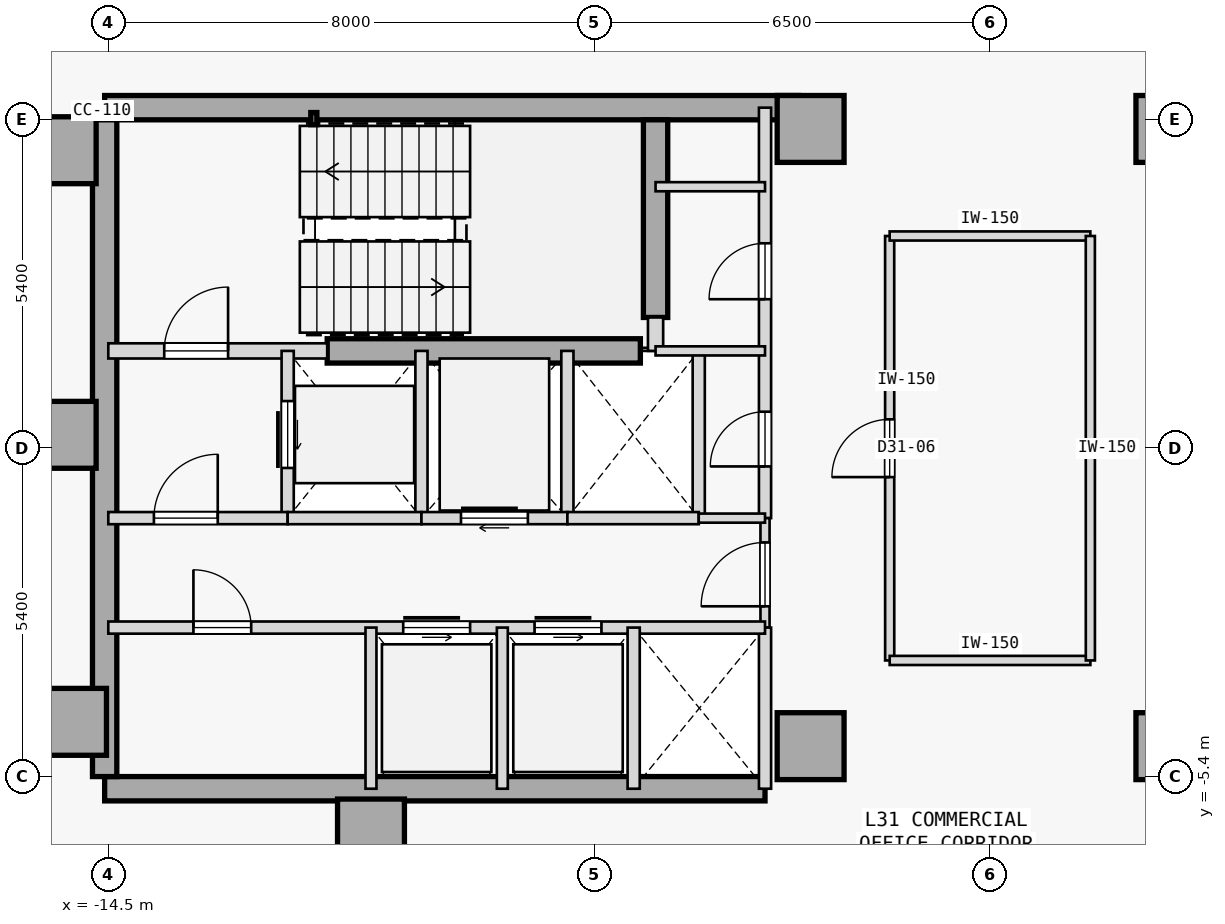
"""IFC4 building model, lengths in metres.
Left out: names, types, materials, properties, quantities, classifications, styles, units other than length and angle.
Written with IfcOpenShell. Run it as: python <this file> out.ifc"""

import sys

from ifc_helpers import new_model, si_unit, direction, frame, frame_2d, origin, origin_2d, place, context, subcontext, project, spatial, rectangle, hollow_rectangle, extrude, element, fill, save


model = new_model("IFC4")
c1 = context("Model", 3, precision=1e-05, world=origin(), true_north=direction((0.0, 1.0)))
c2 = subcontext(c1, "Body", "Model", "MODEL_VIEW")
j1 = project(units=[si_unit("LENGTHUNIT", "METRE"), si_unit("PLANEANGLEUNIT", "RADIAN")], contexts=[c1])
p1 = place(None, origin())
s1 = spatial("IfcSite", under=j1, at=p1, CompositionType="ELEMENT")
p2 = place(p1, origin())
s2 = spatial("IfcBuilding", under=s1, at=p2, CompositionType="ELEMENT")
p3 = place(p2, frame((0.0, 0.0, 124.4)))
s3 = spatial("IfcBuildingStorey", under=s2, at=p3, CompositionType="ELEMENT", Elevation=124.4)
for number, where, z_axis, x_axis in (
    (1, (-15.25, 4.9, 0.0), (0.0, 0.0, 1.0), (1.0, 0.0, 0.0)),
    (2, (-15.25, 0.22, 0.0), (0.0, 0.0, 1.0), (1.0, 0.0, 0.0)),
    (3, (-15.08, -4.5, 0.0), (0.0, 0.0, 1.0), (1.0, 0.0, 0.0)),
    (4, (-10.18, -6.32, 0.0), (0.0, 0.0, 1.0), (1.0, 0.0, 0.0)),
    (5, (-2.95, -4.9, 0.0), (0.0, 0.0, 1.0), (1.0, 0.0, 0.0)),
    (6, (-2.95, 5.25, 0.0), (0.0, 0.0, 1.0), (1.0, 0.0, 0.0)),
    (7, (2.95, -4.9, 0.0), (0.0, 0.0, 1.0), (1.0, 0.0, 0.0)),
    (8, (2.95, 5.25, 0.0), (0.0, 0.0, 1.0), (1.0, 0.0, 0.0)),
):
    element("IfcColumn", number, at=place(p3, frame(where, z_axis=z_axis, x_axis=x_axis)), inside=s3, PredefinedType="COLUMN", context=c2, shape_type="SweptSolid", body=[
        extrude(rectangle(XDim=1.1, YDim=1.1, at=origin_2d()), origin(), (0.0, 0.0, 1.0), 3.7),
    ])
p4 = place(p3, frame((-14.56, 5.6, 0.0), z_axis=(0.0, 0.0, 1.0), x_axis=(1.0, 0.0, 0.0)))
e9 = element("IfcWall", 9, at=p4, inside=s3, PredefinedType="SHEAR", context=c2, shape_type="SweptSolid", body=[
    extrude(rectangle(XDim=11.41, YDim=0.4, at=frame_2d((5.705, 0.0))), origin(), (0.0, 0.0, 1.0), 3.475),
])
p5 = place(p3, frame((-14.56, -5.6, 0.0), z_axis=(0.0, 0.0, 1.0), x_axis=(1.0, 0.0, 0.0)))
e10 = element("IfcWall", 10, at=p5, inside=s3, PredefinedType="SHEAR", context=c2, shape_type="SweptSolid", body=[
    extrude(rectangle(XDim=10.86, YDim=0.4, at=frame_2d((5.43, 0.0))), origin(), (0.0, 0.0, 1.0), 3.475),
])
p6 = place(p3, frame((-14.56, -5.4, 0.0), z_axis=(0.0, 0.0, 1.0), x_axis=(0.0, 1.0, 0.0)))
e11 = element("IfcWall", 11, at=p6, inside=s3, PredefinedType="SHEAR", context=c2, shape_type="SweptSolid", body=[
    extrude(rectangle(XDim=10.8, YDim=0.4, at=frame_2d((5.4, 0.0))), origin(), (0.0, 0.0, 1.0), 3.475),
])
p7 = place(p3, frame((-5.5, 2.15, 0.0), z_axis=(0.0, 0.0, 1.0), x_axis=(0.0, 1.0, 0.0)))
e12 = element("IfcWall", 12, at=p7, inside=s3, PredefinedType="SHEAR", context=c2, shape_type="SweptSolid", body=[
    extrude(rectangle(XDim=3.25, YDim=0.4, at=frame_2d((1.625, 0.0))), origin(), (0.0, 0.0, 1.0), 3.475),
])
p8 = place(p3, frame((-10.9, 1.6, 0.0), z_axis=(0.0, 0.0, 1.0), x_axis=(1.0, 0.0, 0.0)))
e13 = element("IfcWall", 13, at=p8, inside=s3, PredefinedType="SHEAR", context=c2, shape_type="SweptSolid", body=[
    extrude(rectangle(XDim=5.15, YDim=0.4, at=frame_2d((2.575, 0.0))), origin(), (0.0, 0.0, 1.0), 3.475),
])
p9 = place(p3, frame((-11.12, 5.42, 0.0), z_axis=(0.0, 0.0, 1.0), x_axis=(1.0, 0.0, 0.0)))
e14 = element("IfcColumn", 14, at=p9, inside=s3, PredefinedType="COLUMN", context=c2, shape_type="SweptSolid", body=[
    extrude(hollow_rectangle(XDim=0.1, YDim=0.2, WallThickness=0.008, at=origin_2d()), origin(), (0.0, 0.0, 1.0), 3.7),
])
p10 = place(p3, frame((-14.5, 1.6, 0.0), z_axis=(0.0, 0.0, 1.0), x_axis=(1.0, 0.0, 0.0)))
e15 = element("IfcWall", 15, at=p10, inside=s3, PredefinedType="STANDARD", context=c2, shape_type="SweptSolid", body=[
    extrude(rectangle(XDim=3.6, YDim=0.25, at=frame_2d((1.8, 0.0))), origin(), (0.0, 0.0, 1.0), 3.475),
])
p11 = place(p10, frame((0.92, 0.0, 0.0)))
e16 = element("IfcOpeningElement", 16, at=p11, cuts=e15, PredefinedType="OPENING", context=c2, shape_type="SweptSolid", body=[
    extrude(rectangle(XDim=1.05, YDim=2.15, at=frame_2d((0.525, 1.075))), frame((0.0, 0.135, 0.0), z_axis=(0.0, -1.0, 0.0), x_axis=(1.0, 0.0, 0.0)), (0.0, 0.0, 1.0), 0.27),
])
p12 = place(p3, frame((-5.5, 1.6, 0.0), z_axis=(0.0, 0.0, 1.0), x_axis=(0.0, 1.0, 0.0)))
e17 = element("IfcWall", 17, at=p12, inside=s3, PredefinedType="STANDARD", context=c2, shape_type="SweptSolid", body=[
    extrude(rectangle(XDim=0.55, YDim=0.25, at=frame_2d((0.275, 0.0))), origin(), (0.0, 0.0, 1.0), 3.475),
])
p13 = place(p3, frame((-3.7, -1.15, 0.0), z_axis=(0.0, 0.0, 1.0), x_axis=(0.0, 1.0, 0.0)))
e18 = element("IfcWall", 18, at=p13, inside=s3, PredefinedType="STANDARD", context=c2, shape_type="SweptSolid", body=[
    extrude(rectangle(XDim=6.75, YDim=0.2, at=frame_2d((3.375, 0.0))), origin(), (0.0, 0.0, 1.0), 3.475),
])
p14 = place(p13, frame((3.6, 0.0, 0.0)))
e19 = element("IfcOpeningElement", 19, at=p14, cuts=e18, PredefinedType="OPENING", context=c2, shape_type="SweptSolid", body=[
    extrude(rectangle(XDim=0.92, YDim=2.15, at=frame_2d((0.46, 1.075))), frame((0.0, 0.11, 0.0), z_axis=(0.0, -1.0, 0.0), x_axis=(1.0, 0.0, 0.0)), (0.0, 0.0, 1.0), 0.22),
])
p15 = place(p13, frame((0.85, 0.0, 0.0)))
e20 = element("IfcOpeningElement", 20, at=p15, cuts=e18, PredefinedType="OPENING", context=c2, shape_type="SweptSolid", body=[
    extrude(rectangle(XDim=0.9, YDim=2.15, at=frame_2d((0.45, 1.075))), frame((0.0, 0.11, 0.0), z_axis=(0.0, -1.0, 0.0), x_axis=(1.0, 0.0, 0.0)), (0.0, 0.0, 1.0), 0.22),
])
p16 = place(p3, frame((-3.7, -2.95, 0.0), z_axis=(0.0, 0.0, 1.0), x_axis=(0.0, 1.0, 0.0)))
e21 = element("IfcWall", 21, at=p16, inside=s3, PredefinedType="PARTITIONING", context=c2, shape_type="SweptSolid", body=[
    extrude(rectangle(XDim=1.8, YDim=0.15, at=frame_2d((0.9, 0.0))), origin(), (0.0, 0.0, 1.0), 3.475),
])
p17 = place(p16, frame((0.35, 0.0, 0.0)))
e22 = element("IfcOpeningElement", 22, at=p17, cuts=e21, PredefinedType="OPENING", context=c2, shape_type="SweptSolid", body=[
    extrude(rectangle(XDim=1.05, YDim=2.18, at=frame_2d((0.525, 1.09))), frame((0.0, 0.085, 0.0), z_axis=(0.0, -1.0, 0.0), x_axis=(1.0, 0.0, 0.0)), (0.0, 0.0, 1.0), 0.17),
])
p18 = place(p3, frame((-3.7, -5.6, 0.0), z_axis=(0.0, 0.0, 1.0), x_axis=(0.0, 1.0, 0.0)))
e23 = element("IfcWall", 23, at=p18, inside=s3, PredefinedType="STANDARD", context=c2, shape_type="SweptSolid", body=[
    extrude(rectangle(XDim=2.65, YDim=0.2, at=frame_2d((1.325, 0.0))), origin(), (0.0, 0.0, 1.0), 3.475),
])
p19 = place(p3, frame((-11.55, -1.15, 0.0), z_axis=(0.0, 0.0, 1.0), x_axis=(0.0, 1.0, 0.0)))
e24 = element("IfcWall", 24, at=p19, inside=s3, PredefinedType="STANDARD", context=c2, shape_type="SweptSolid", body=[
    extrude(rectangle(XDim=2.75, YDim=0.2, at=frame_2d((1.375, 0.0))), origin(), (0.0, 0.0, 1.0), 3.475),
])
p20 = place(p19, frame((0.825, 0.0, 0.0)))
e25 = element("IfcOpeningElement", 25, at=p20, cuts=e24, PredefinedType="OPENING", context=c2, shape_type="SweptSolid", body=[
    extrude(rectangle(XDim=1.1, YDim=2.15, at=frame_2d((0.55, 1.075))), frame((0.0, 0.11, 0.0), z_axis=(0.0, -1.0, 0.0), x_axis=(1.0, 0.0, 0.0)), (0.0, 0.0, 1.0), 0.22),
])
p21 = place(p3, frame((-9.35, -1.15, 0.0), z_axis=(0.0, 0.0, 1.0), x_axis=(0.0, 1.0, 0.0)))
e26 = element("IfcWall", 26, at=p21, inside=s3, PredefinedType="STANDARD", context=c2, shape_type="SweptSolid", body=[
    extrude(rectangle(XDim=2.75, YDim=0.2, at=frame_2d((1.375, 0.0))), origin(), (0.0, 0.0, 1.0), 3.475),
])
p22 = place(p3, frame((-14.5, -1.15, 0.0), z_axis=(0.0, 0.0, 1.0), x_axis=(1.0, 0.0, 0.0)))
e27 = element("IfcWall", 27, at=p22, inside=s3, PredefinedType="STANDARD", context=c2, shape_type="SweptSolid", body=[
    extrude(rectangle(XDim=2.95, YDim=0.2, at=frame_2d((1.475, 0.0))), origin(), (0.0, 0.0, 1.0), 3.475),
])
p23 = place(p22, frame((0.75, 0.0, 0.0)))
e28 = element("IfcOpeningElement", 28, at=p23, cuts=e27, PredefinedType="OPENING", context=c2, shape_type="SweptSolid", body=[
    extrude(rectangle(XDim=1.05, YDim=2.18, at=frame_2d((0.525, 1.09))), frame((0.0, 0.11, 0.0), z_axis=(0.0, -1.0, 0.0), x_axis=(1.0, 0.0, 0.0)), (0.0, 0.0, 1.0), 0.22),
])
p24 = place(p3, frame((-11.55, -1.15, 0.0), z_axis=(0.0, 0.0, 1.0), x_axis=(1.0, 0.0, 0.0)))
e29 = element("IfcWall", 29, at=p24, inside=s3, PredefinedType="STANDARD", context=c2, shape_type="SweptSolid", body=[
    extrude(rectangle(XDim=2.2, YDim=0.2, at=frame_2d((1.1, 0.0))), origin(), (0.0, 0.0, 1.0), 3.475),
])
p25 = place(p3, frame((-6.95, -1.15, 0.0), z_axis=(0.0, 0.0, 1.0), x_axis=(0.0, 1.0, 0.0)))
e30 = element("IfcWall", 30, at=p25, inside=s3, PredefinedType="STANDARD", context=c2, shape_type="SweptSolid", body=[
    extrude(rectangle(XDim=2.75, YDim=0.2, at=frame_2d((1.375, 0.0))), origin(), (0.0, 0.0, 1.0), 3.475),
])
p26 = place(p3, frame((-9.35, -1.15, 0.0), z_axis=(0.0, 0.0, 1.0), x_axis=(1.0, 0.0, 0.0)))
e31 = element("IfcWall", 31, at=p26, inside=s3, PredefinedType="STANDARD", context=c2, shape_type="SweptSolid", body=[
    extrude(rectangle(XDim=2.4, YDim=0.2, at=frame_2d((1.2, 0.0))), origin(), (0.0, 0.0, 1.0), 3.475),
])
p27 = place(p26, frame((0.65, 0.0, 0.0)))
e32 = element("IfcOpeningElement", 32, at=p27, cuts=e31, PredefinedType="OPENING", context=c2, shape_type="SweptSolid", body=[
    extrude(rectangle(XDim=1.1, YDim=2.15, at=frame_2d((0.55, 1.075))), frame((0.0, 0.11, 0.0), z_axis=(0.0, -1.0, 0.0), x_axis=(1.0, 0.0, 0.0)), (0.0, 0.0, 1.0), 0.22),
])
p28 = place(p3, frame((-4.79, -1.15, 0.0), z_axis=(0.0, 0.0, 1.0), x_axis=(0.0, 1.0, 0.0)))
e33 = element("IfcWall", 33, at=p28, inside=s3, PredefinedType="STANDARD", context=c2, shape_type="SweptSolid", body=[
    extrude(rectangle(XDim=2.75, YDim=0.2, at=frame_2d((1.375, 0.0))), origin(), (0.0, 0.0, 1.0), 3.475),
])
p29 = place(p3, frame((-6.95, -1.15, 0.0), z_axis=(0.0, 0.0, 1.0), x_axis=(1.0, 0.0, 0.0)))
e34 = element("IfcWall", 34, at=p29, inside=s3, PredefinedType="STANDARD", context=c2, shape_type="SweptSolid", body=[
    extrude(rectangle(XDim=2.16, YDim=0.2, at=frame_2d((1.08, 0.0))), origin(), (0.0, 0.0, 1.0), 3.475),
])
p30 = place(p3, frame((-4.79, -1.15, 0.0), z_axis=(0.0, 0.0, 1.0), x_axis=(1.0, 0.0, 0.0)))
e35 = element("IfcWall", 35, at=p30, inside=s3, PredefinedType="PARTITIONING", context=c2, shape_type="SweptSolid", body=[
    extrude(rectangle(XDim=1.09, YDim=0.15, at=frame_2d((0.545, 0.0))), origin(), (0.0, 0.0, 1.0), 3.475),
])
p31 = place(p3, frame((-14.5, -2.95, 0.0), z_axis=(0.0, 0.0, 1.0), x_axis=(1.0, 0.0, 0.0)))
e36 = element("IfcWall", 36, at=p31, inside=s3, PredefinedType="STANDARD", context=c2, shape_type="SweptSolid", body=[
    extrude(rectangle(XDim=10.8, YDim=0.2, at=frame_2d((5.4, 0.0))), origin(), (0.0, 0.0, 1.0), 3.475),
])
p32 = place(p31, frame((4.85, 0.0, 0.0)))
e37 = element("IfcOpeningElement", 37, at=p32, cuts=e36, PredefinedType="OPENING", context=c2, shape_type="SweptSolid", body=[
    extrude(rectangle(XDim=1.1, YDim=2.15, at=frame_2d((0.55, 1.075))), frame((0.0, 0.11, 0.0), z_axis=(0.0, -1.0, 0.0), x_axis=(1.0, 0.0, 0.0)), (0.0, 0.0, 1.0), 0.22),
])
p33 = place(p31, frame((7.01, 0.0, 0.0)))
e38 = element("IfcOpeningElement", 38, at=p33, cuts=e36, PredefinedType="OPENING", context=c2, shape_type="SweptSolid", body=[
    extrude(rectangle(XDim=1.1, YDim=2.15, at=frame_2d((0.55, 1.075))), frame((0.0, 0.11, 0.0), z_axis=(0.0, -1.0, 0.0), x_axis=(1.0, 0.0, 0.0)), (0.0, 0.0, 1.0), 0.22),
])
p34 = place(p31, frame((1.4, 0.0, 0.0)))
e39 = element("IfcOpeningElement", 39, at=p34, cuts=e36, PredefinedType="OPENING", context=c2, shape_type="SweptSolid", body=[
    extrude(rectangle(XDim=0.95, YDim=2.15, at=frame_2d((0.475, 1.075))), frame((0.0, 0.11, 0.0), z_axis=(0.0, -1.0, 0.0), x_axis=(1.0, 0.0, 0.0)), (0.0, 0.0, 1.0), 0.22),
])
p35 = place(p3, frame((-5.86, -5.6, 0.0), z_axis=(0.0, 0.0, 1.0), x_axis=(0.0, 1.0, 0.0)))
e40 = element("IfcWall", 40, at=p35, inside=s3, PredefinedType="STANDARD", context=c2, shape_type="SweptSolid", body=[
    extrude(rectangle(XDim=2.65, YDim=0.2, at=frame_2d((1.325, 0.0))), origin(), (0.0, 0.0, 1.0), 3.475),
])
for number, where, z_axis, x_axis in (
    (41, (-10.18, -5.6, 0.0), (0.0, 0.0, 1.0), (0.0, 1.0, 0.0)),
    (42, (-8.02, -5.6, 0.0), (0.0, 0.0, 1.0), (0.0, 1.0, 0.0)),
):
    element("IfcWall", number, at=place(p3, frame(where, z_axis=z_axis, x_axis=x_axis)), inside=s3, PredefinedType="STANDARD", context=c2, shape_type="SweptSolid", body=[
        extrude(rectangle(XDim=2.65, YDim=0.18, at=frame_2d((1.325, 0.0))), origin(), (0.0, 0.0, 1.0), 3.475),
    ])
for number, where, z_axis, x_axis in (
    (43, (-5.5, 4.3, 0.0), (0.0, 0.0, 1.0), (1.0, 0.0, 0.0)),
    (44, (-5.5, 1.6, 0.0), (0.0, 0.0, 1.0), (1.0, 0.0, 0.0)),
):
    element("IfcWall", number, at=place(p3, frame(where, z_axis=z_axis, x_axis=x_axis)), inside=s3, PredefinedType="PARTITIONING", context=c2, shape_type="SweptSolid", body=[
        extrude(rectangle(XDim=1.8, YDim=0.15, at=frame_2d((0.9, 0.0))), origin(), (0.0, 0.0, 1.0), 3.475),
    ])
p36 = place(p3, frame((-1.65, -3.49, 0.0), z_axis=(0.0, 0.0, 1.0), x_axis=(-0.000104928124, 0.999999994495, 0.0)))
e45 = element("IfcWall", 45, at=p36, inside=s3, PredefinedType="PARTITIONING", context=c2, shape_type="SweptSolid", body=[
    extrude(rectangle(XDim=6.98, YDim=0.15, at=frame_2d((3.49, 0.0))), origin(), (0.0, 0.0, 1.0), 3.475),
])
p37 = place(p36, frame((3.015, 0.0, 0.0)))
e46 = element("IfcOpeningElement", 46, at=p37, cuts=e45, PredefinedType="OPENING", context=c2, shape_type="SweptSolid", body=[
    extrude(rectangle(XDim=0.95, YDim=2.15, at=frame_2d((0.475, 1.075))), frame((0.0, 0.085, 0.0), z_axis=(0.0, -1.0, 0.0), x_axis=(1.0, 0.0, 0.0)), (0.0, 0.0, 1.0), 0.17),
])
p38 = place(p3, frame((-1.65, -3.49, 0.0), z_axis=(0.0, 0.0, 1.0), x_axis=(1.0, 0.0, 0.0)))
e47 = element("IfcWall", 47, at=p38, inside=s3, PredefinedType="PARTITIONING", context=c2, shape_type="SweptSolid", body=[
    extrude(rectangle(XDim=3.3, YDim=0.15, at=frame_2d((1.65, 0.0))), origin(), (0.0, 0.0, 1.0), 3.475),
])
p39 = place(p3, frame((-1.65, 3.49, 0.0), z_axis=(0.0, 0.0, 1.0), x_axis=(1.0, 0.0, 0.0)))
e48 = element("IfcWall", 48, at=p39, inside=s3, PredefinedType="PARTITIONING", context=c2, shape_type="SweptSolid", body=[
    extrude(rectangle(XDim=3.3, YDim=0.15, at=frame_2d((1.65, 0.0))), origin(), (0.0, 0.0, 1.0), 3.475),
])
p40 = place(p3, frame((1.65, -3.49, 0.0), z_axis=(0.0, 0.0, 1.0), x_axis=(-6.9952083e-05, 0.999999997553, 0.0)))
e49 = element("IfcWall", 49, at=p40, inside=s3, PredefinedType="PARTITIONING", context=c2, shape_type="SweptSolid", body=[
    extrude(rectangle(XDim=6.98, YDim=0.15, at=frame_2d((3.49, 0.0))), origin(), (0.0, 0.0, 1.0), 3.475),
])
p41 = place(p11, origin())
e50 = element("IfcDoor", 50, at=p41, inside=s3, OperationType="SINGLE_SWING_RIGHT", PredefinedType="DOOR", context=c2, shape_type="SweptSolid", body=[
    extrude(rectangle(XDim=1.05, YDim=2.15, at=frame_2d((0.525, 1.075))), frame((0.0, 0.025, 0.0), z_axis=(0.0, -1.0, 0.0), x_axis=(1.0, 0.0, 0.0)), (0.0, 0.0, 1.0), 0.05),
])
fill(e16, e50)
p42 = place(p23, origin())
e51 = element("IfcDoor", 51, at=p42, inside=s3, OperationType="SINGLE_SWING_RIGHT", PredefinedType="DOOR", context=c2, shape_type="SweptSolid", body=[
    extrude(rectangle(XDim=1.05, YDim=2.18, at=frame_2d((0.525, 1.09))), frame((0.0, 0.025, 0.0), z_axis=(0.0, -1.0, 0.0), x_axis=(1.0, 0.0, 0.0)), (0.0, 0.0, 1.0), 0.05),
])
fill(e28, e51)
p43 = place(p17, origin())
e52 = element("IfcDoor", 52, at=p43, inside=s3, OperationType="SINGLE_SWING_LEFT", PredefinedType="DOOR", context=c2, shape_type="SweptSolid", body=[
    extrude(rectangle(XDim=1.05, YDim=2.18, at=frame_2d((0.525, 1.09))), frame((0.0, 0.025, 0.0), z_axis=(0.0, -1.0, 0.0), x_axis=(1.0, 0.0, 0.0)), (0.0, 0.0, 1.0), 0.05),
])
fill(e22, e52)
p44 = place(p20, origin())
e53 = element("IfcDoor", 53, at=p44, inside=s3, OperationType="SLIDING_TO_RIGHT", PredefinedType="DOOR", context=c2, shape_type="SweptSolid", body=[
    extrude(rectangle(XDim=1.1, YDim=2.15, at=frame_2d((0.55, 1.075))), frame((0.0, 0.025, 0.0), z_axis=(0.0, -1.0, 0.0), x_axis=(1.0, 0.0, 0.0)), (0.0, 0.0, 1.0), 0.05),
])
fill(e25, e53)
p45 = place(p27, origin())
e54 = element("IfcDoor", 54, at=p45, inside=s3, OperationType="SLIDING_TO_RIGHT", PredefinedType="DOOR", context=c2, shape_type="SweptSolid", body=[
    extrude(rectangle(XDim=1.1, YDim=2.15, at=frame_2d((0.55, 1.075))), frame((0.0, 0.025, 0.0), z_axis=(0.0, -1.0, 0.0), x_axis=(1.0, 0.0, 0.0)), (0.0, 0.0, 1.0), 0.05),
])
fill(e32, e54)
p46 = place(p32, origin())
e55 = element("IfcDoor", 55, at=p46, inside=s3, OperationType="SLIDING_TO_LEFT", PredefinedType="DOOR", context=c2, shape_type="SweptSolid", body=[
    extrude(rectangle(XDim=1.1, YDim=2.15, at=frame_2d((0.55, 1.075))), frame((0.0, 0.025, 0.0), z_axis=(0.0, -1.0, 0.0), x_axis=(1.0, 0.0, 0.0)), (0.0, 0.0, 1.0), 0.05),
])
fill(e37, e55)
p47 = place(p33, origin())
e56 = element("IfcDoor", 56, at=p47, inside=s3, OperationType="SLIDING_TO_LEFT", PredefinedType="DOOR", context=c2, shape_type="SweptSolid", body=[
    extrude(rectangle(XDim=1.1, YDim=2.15, at=frame_2d((0.55, 1.075))), frame((0.0, 0.025, 0.0), z_axis=(0.0, -1.0, 0.0), x_axis=(1.0, 0.0, 0.0)), (0.0, 0.0, 1.0), 0.05),
])
fill(e38, e56)
p48 = place(p34, origin())
e57 = element("IfcDoor", 57, at=p48, inside=s3, OperationType="SINGLE_SWING_LEFT", PredefinedType="DOOR", context=c2, shape_type="SweptSolid", body=[
    extrude(rectangle(XDim=0.95, YDim=2.15, at=frame_2d((0.475, 1.075))), frame((0.0, 0.025, 0.0), z_axis=(0.0, -1.0, 0.0), x_axis=(1.0, 0.0, 0.0)), (0.0, 0.0, 1.0), 0.05),
])
fill(e39, e57)
p49 = place(p14, origin())
e58 = element("IfcDoor", 58, at=p49, inside=s3, OperationType="SINGLE_SWING_LEFT", PredefinedType="DOOR", context=c2, shape_type="SweptSolid", body=[
    extrude(rectangle(XDim=0.92, YDim=2.15, at=frame_2d((0.46, 1.075))), frame((0.0, 0.025, 0.0), z_axis=(0.0, -1.0, 0.0), x_axis=(1.0, 0.0, 0.0)), (0.0, 0.0, 1.0), 0.05),
])
fill(e19, e58)
p50 = place(p15, origin())
e59 = element("IfcDoor", 59, at=p50, inside=s3, OperationType="SINGLE_SWING_LEFT", PredefinedType="DOOR", context=c2, shape_type="SweptSolid", body=[
    extrude(rectangle(XDim=0.9, YDim=2.15, at=frame_2d((0.45, 1.075))), frame((0.0, 0.025, 0.0), z_axis=(0.0, -1.0, 0.0), x_axis=(1.0, 0.0, 0.0)), (0.0, 0.0, 1.0), 0.05),
])
fill(e20, e59)
p51 = place(p37, origin())
e60 = element("IfcDoor", 60, at=p51, inside=s3, OperationType="SINGLE_SWING_LEFT", PredefinedType="DOOR", context=c2, shape_type="SweptSolid", body=[
    extrude(rectangle(XDim=0.95, YDim=2.15, at=frame_2d((0.475, 1.075))), frame((0.0, 0.025, 0.0), z_axis=(0.0, -1.0, 0.0), x_axis=(1.0, 0.0, 0.0)), (0.0, 0.0, 1.0), 0.05),
])
fill(e46, e60)
save(model, sys.argv[1])
